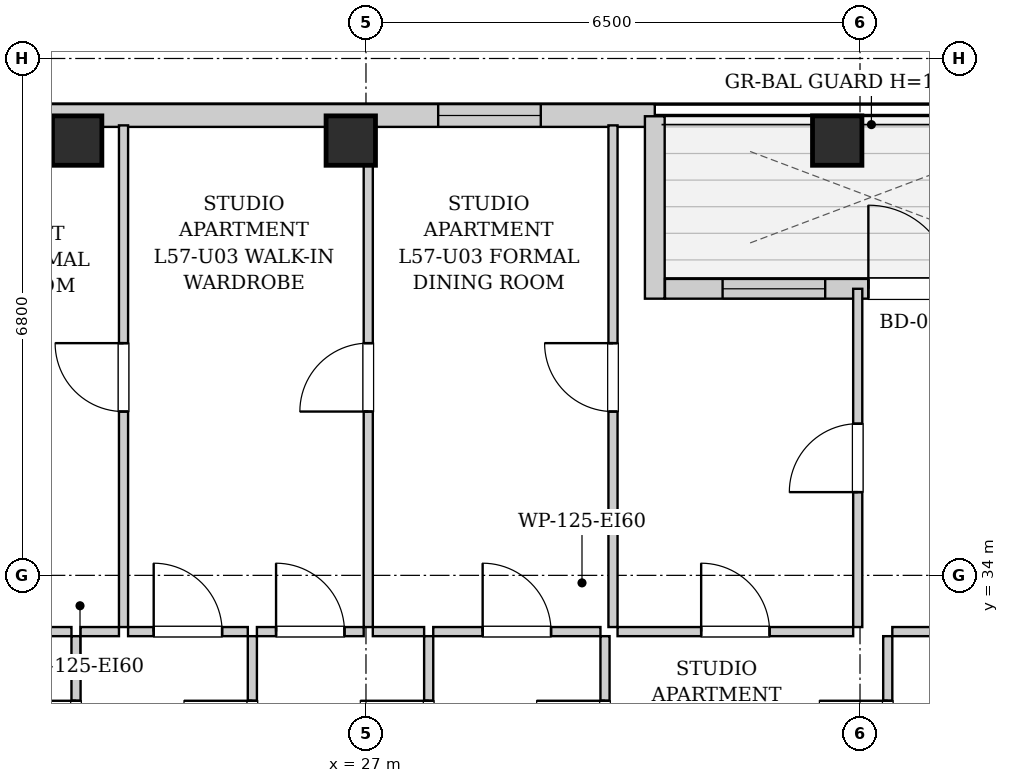
"""IFC4 building model, lengths in metres.
Left out: names, types, materials, properties, quantities, classifications, styles, units other than length and angle.
Written with IfcOpenShell. Run it as: python <this file> out.ifc"""

import sys

from ifc_helpers import new_model, si_unit, direction, frame, frame_2d, origin, origin_2d, place, context, subcontext, project, spatial, rectangle, extrude, element, fill, save


model = new_model("IFC4")
c1 = context("Model", 3, precision=1e-05, world=origin(), true_north=direction((0.0, 1.0)))
c2 = subcontext(c1, "Body", "Model", "MODEL_VIEW")
j1 = project(units=[si_unit("LENGTHUNIT", "METRE"), si_unit("PLANEANGLEUNIT", "RADIAN")], contexts=[c1])
p1 = place(None, origin())
s1 = spatial("IfcSite", under=j1, at=p1, CompositionType="ELEMENT")
p2 = place(p1, origin())
s2 = spatial("IfcBuilding", under=s1, at=p2, CompositionType="ELEMENT")
p3 = place(p2, frame((0.0, 0.0, 197.5)))
s3 = spatial("IfcBuildingStorey", under=s2, at=p3, CompositionType="ELEMENT", Elevation=197.5)
for number, where, z_axis, x_axis in (
    (1, (23.2, 39.72, 0.0), (0.0, 0.0, 1.0), (1.0, 0.0, 0.0)),
    (2, (26.8, 39.72, 0.0), (0.0, 0.0, 1.0), (1.0, 0.0, 0.0)),
    (3, (33.2, 39.72, 0.0), (0.0, 0.0, 1.0), (1.0, 0.0, 0.0)),
):
    element("IfcColumn", number, at=place(p3, frame(where, z_axis=z_axis, x_axis=x_axis)), inside=s3, PredefinedType="COLUMN", context=c2, shape_type="SweptSolid", body=[
        extrude(rectangle(XDim=0.65, YDim=0.65, at=origin_2d()), origin(), (0.0, 0.0, 1.0), 3.3),
    ])
p4 = place(p3, frame((13.1, 40.05, 0.0), z_axis=(0.0, 0.0, 1.0), x_axis=(1.0, 0.0, 0.0)))
e4 = element("IfcWall", 4, at=p4, inside=s3, PredefinedType="SOLIDWALL", context=c2, shape_type="SweptSolid", body=[
    extrude(rectangle(XDim=17.7, YDim=0.3, at=frame_2d((8.85, 0.0))), origin(), (0.0, 0.0, 1.0), 3.04),
])
p5 = place(p4, frame((1.95, 0.0, 0.55)))
e5 = element("IfcOpeningElement", 5, at=p5, cuts=e4, PredefinedType="OPENING", context=c2, shape_type="SweptSolid", body=[
    extrude(rectangle(XDim=1.35, YDim=1.2, at=frame_2d((0.675, 0.6))), frame((0.0, 0.16, 0.0), z_axis=(0.0, -1.0, 0.0), x_axis=(1.0, 0.0, 0.0)), (0.0, 0.0, 1.0), 0.32),
])
p6 = place(p4, frame((5.25, 0.0, 0.55)))
e6 = element("IfcOpeningElement", 6, at=p6, cuts=e4, PredefinedType="OPENING", context=c2, shape_type="SweptSolid", body=[
    extrude(rectangle(XDim=1.35, YDim=1.2, at=frame_2d((0.675, 0.6))), frame((0.0, 0.16, 0.0), z_axis=(0.0, -1.0, 0.0), x_axis=(1.0, 0.0, 0.0)), (0.0, 0.0, 1.0), 0.32),
])
p7 = place(p4, frame((8.05, 0.0, 0.55)))
e7 = element("IfcOpeningElement", 7, at=p7, cuts=e4, PredefinedType="OPENING", context=c2, shape_type="SweptSolid", body=[
    extrude(rectangle(XDim=1.35, YDim=1.2, at=frame_2d((0.675, 0.6))), frame((0.0, 0.16, 0.0), z_axis=(0.0, -1.0, 0.0), x_axis=(1.0, 0.0, 0.0)), (0.0, 0.0, 1.0), 0.32),
])
p8 = place(p4, frame((14.85, 0.0, 0.55)))
e8 = element("IfcOpeningElement", 8, at=p8, cuts=e4, PredefinedType="OPENING", context=c2, shape_type="SweptSolid", body=[
    extrude(rectangle(XDim=1.35, YDim=1.2, at=frame_2d((0.675, 0.6))), frame((0.0, 0.16, 0.0), z_axis=(0.0, -1.0, 0.0), x_axis=(1.0, 0.0, 0.0)), (0.0, 0.0, 1.0), 0.32),
])
p9 = place(p3, frame((30.8, 40.04, 0.0), z_axis=(0.0, 0.0, 1.0), x_axis=(0.0, -1.0, 0.0)))
e9 = element("IfcWall", 9, at=p9, inside=s3, PredefinedType="SOLIDWALL", context=c2, shape_type="SweptSolid", body=[
    extrude(rectangle(XDim=2.4, YDim=0.26, at=frame_2d((1.2, 0.0))), origin(), (0.0, 0.0, 1.0), 3.04),
])
p10 = place(p3, frame((30.934, 37.77, 0.0), z_axis=(0.0, 0.0, 1.0), x_axis=(1.0, 0.0, 0.0)))
e10 = element("IfcWall", 10, at=p10, inside=s3, PredefinedType="SOLIDWALL", context=c2, shape_type="SweptSolid", body=[
    extrude(rectangle(XDim=5.432, YDim=0.26, at=frame_2d((2.716, 0.0))), origin(), (0.0, 0.0, 1.0), 3.04),
])
p11 = place(p10, frame((2.676, 0.0, 0.0)))
e11 = element("IfcOpeningElement", 11, at=p11, cuts=e10, PredefinedType="OPENING", context=c2, shape_type="SweptSolid", body=[
    extrude(rectangle(XDim=1.1, YDim=2.0, at=frame_2d((0.55, 1.0))), frame((0.0, 0.14, 0.0), z_axis=(0.0, -1.0, 0.0), x_axis=(1.0, 0.0, 0.0)), (0.0, 0.0, 1.0), 0.28),
])
p12 = place(p10, frame((0.758, 0.0, 0.55)))
e12 = element("IfcOpeningElement", 12, at=p12, cuts=e10, PredefinedType="OPENING", context=c2, shape_type="SweptSolid", body=[
    extrude(rectangle(XDim=1.35, YDim=1.2, at=frame_2d((0.675, 0.6))), frame((0.0, 0.14, 0.0), z_axis=(0.0, -1.0, 0.0), x_axis=(1.0, 0.0, 0.0)), (0.0, 0.0, 1.0), 0.28),
])
p13 = place(p3, frame((23.185, 30.6, 0.0), z_axis=(0.0, 0.0, 1.0), x_axis=(0.0, 1.0, 0.0)))
e13 = element("IfcWall", 13, at=p13, inside=s3, PredefinedType="PARTITIONING", context=c2, shape_type="SweptSolid", body=[
    extrude(rectangle(XDim=2.6, YDim=0.12, at=frame_2d((1.3, 0.0))), origin(), (0.0, 0.0, 1.0), 3.04),
])
p14 = place(p13, frame((0.85, 0.0, 0.0)))
e14 = element("IfcOpeningElement", 14, at=p14, cuts=e13, PredefinedType="OPENING", context=c2, shape_type="SweptSolid", body=[
    extrude(rectangle(XDim=0.9, YDim=2.05, at=frame_2d((0.45, 1.025))), frame((0.0, 0.07, 0.0), z_axis=(0.0, -1.0, 0.0), x_axis=(1.0, 0.0, 0.0)), (0.0, 0.0, 1.0), 0.14),
])
p15 = place(p3, frame((20.65, 33.26, 0.0), z_axis=(0.0, 0.0, 1.0), x_axis=(1.0, 0.0, 0.0)))
e15 = element("IfcWall", 15, at=p15, inside=s3, PredefinedType="PARTITIONING", context=c2, shape_type="SweptSolid", body=[
    extrude(rectangle(XDim=2.475, YDim=0.12, at=frame_2d((1.238, 0.0))), origin(), (0.0, 0.0, 1.0), 3.04),
])
p16 = place(p15, frame((0.787, 0.0, 0.0)))
e16 = element("IfcOpeningElement", 16, at=p16, cuts=e15, PredefinedType="OPENING", context=c2, shape_type="SweptSolid", body=[
    extrude(rectangle(XDim=0.9, YDim=2.05, at=frame_2d((0.45, 1.025))), frame((0.0, 0.07, 0.0), z_axis=(0.0, -1.0, 0.0), x_axis=(1.0, 0.0, 0.0)), (0.0, 0.0, 1.0), 0.14),
])
p17 = place(p3, frame((25.505, 30.6, 0.0), z_axis=(0.0, 0.0, 1.0), x_axis=(0.0, 1.0, 0.0)))
e17 = element("IfcWall", 17, at=p17, inside=s3, PredefinedType="PARTITIONING", context=c2, shape_type="SweptSolid", body=[
    extrude(rectangle(XDim=2.6, YDim=0.12, at=frame_2d((1.3, 0.0))), origin(), (0.0, 0.0, 1.0), 3.04),
])
p18 = place(p17, frame((0.85, 0.0, 0.0)))
e18 = element("IfcOpeningElement", 18, at=p18, cuts=e17, PredefinedType="OPENING", context=c2, shape_type="SweptSolid", body=[
    extrude(rectangle(XDim=0.9, YDim=2.05, at=frame_2d((0.45, 1.025))), frame((0.0, 0.07, 0.0), z_axis=(0.0, -1.0, 0.0), x_axis=(1.0, 0.0, 0.0)), (0.0, 0.0, 1.0), 0.14),
])
p19 = place(p3, frame((23.245, 33.26, 0.0), z_axis=(0.0, 0.0, 1.0), x_axis=(1.0, 0.0, 0.0)))
e19 = element("IfcWall", 19, at=p19, inside=s3, PredefinedType="PARTITIONING", context=c2, shape_type="SweptSolid", body=[
    extrude(rectangle(XDim=0.505, YDim=0.12, at=frame_2d((0.252, 0.0))), origin(), (0.0, 0.0, 1.0), 3.04),
])
p20 = place(p3, frame((23.87, 33.26, 0.0), z_axis=(0.0, 0.0, 1.0), x_axis=(1.0, 0.0, 0.0)))
e20 = element("IfcWall", 20, at=p20, inside=s3, PredefinedType="PARTITIONING", context=c2, shape_type="SweptSolid", body=[
    extrude(rectangle(XDim=1.575, YDim=0.12, at=frame_2d((0.788, 0.0))), origin(), (0.0, 0.0, 1.0), 3.04),
])
p21 = place(p20, frame((0.337, 0.0, 0.0)))
e21 = element("IfcOpeningElement", 21, at=p21, cuts=e20, PredefinedType="OPENING", context=c2, shape_type="SweptSolid", body=[
    extrude(rectangle(XDim=0.9, YDim=2.05, at=frame_2d((0.45, 1.025))), frame((0.0, 0.07, 0.0), z_axis=(0.0, -1.0, 0.0), x_axis=(1.0, 0.0, 0.0)), (0.0, 0.0, 1.0), 0.14),
])
p22 = place(p3, frame((27.825, 30.6, 0.0), z_axis=(0.0, 0.0, 1.0), x_axis=(0.0, 1.0, 0.0)))
e22 = element("IfcWall", 22, at=p22, inside=s3, PredefinedType="PARTITIONING", context=c2, shape_type="SweptSolid", body=[
    extrude(rectangle(XDim=2.6, YDim=0.12, at=frame_2d((1.3, 0.0))), origin(), (0.0, 0.0, 1.0), 3.04),
])
p23 = place(p22, frame((0.85, 0.0, 0.0)))
e23 = element("IfcOpeningElement", 23, at=p23, cuts=e22, PredefinedType="OPENING", context=c2, shape_type="SweptSolid", body=[
    extrude(rectangle(XDim=0.9, YDim=2.05, at=frame_2d((0.45, 1.025))), frame((0.0, 0.07, 0.0), z_axis=(0.0, -1.0, 0.0), x_axis=(1.0, 0.0, 0.0)), (0.0, 0.0, 1.0), 0.14),
])
p24 = place(p3, frame((25.565, 33.26, 0.0), z_axis=(0.0, 0.0, 1.0), x_axis=(1.0, 0.0, 0.0)))
e24 = element("IfcWall", 24, at=p24, inside=s3, PredefinedType="PARTITIONING", context=c2, shape_type="SweptSolid", body=[
    extrude(rectangle(XDim=1.405, YDim=0.12, at=frame_2d((0.703, 0.0))), origin(), (0.0, 0.0, 1.0), 3.04),
])
p25 = place(p24, frame((0.252, 0.0, 0.0)))
e25 = element("IfcOpeningElement", 25, at=p25, cuts=e24, PredefinedType="OPENING", context=c2, shape_type="SweptSolid", body=[
    extrude(rectangle(XDim=0.9, YDim=2.05, at=frame_2d((0.45, 1.025))), frame((0.0, 0.07, 0.0), z_axis=(0.0, -1.0, 0.0), x_axis=(1.0, 0.0, 0.0)), (0.0, 0.0, 1.0), 0.14),
])
p26 = place(p3, frame((27.09, 33.26, 0.0), z_axis=(0.0, 0.0, 1.0), x_axis=(1.0, 0.0, 0.0)))
e26 = element("IfcWall", 26, at=p26, inside=s3, PredefinedType="PARTITIONING", context=c2, shape_type="SweptSolid", body=[
    extrude(rectangle(XDim=0.675, YDim=0.12, at=frame_2d((0.337, 0.0))), origin(), (0.0, 0.0, 1.0), 3.04),
])
p27 = place(p3, frame((30.145, 30.6, 0.0), z_axis=(0.0, 0.0, 1.0), x_axis=(0.0, 1.0, 0.0)))
e27 = element("IfcWall", 27, at=p27, inside=s3, PredefinedType="PARTITIONING", context=c2, shape_type="SweptSolid", body=[
    extrude(rectangle(XDim=2.6, YDim=0.12, at=frame_2d((1.3, 0.0))), origin(), (0.0, 0.0, 1.0), 3.04),
])
p28 = place(p27, frame((0.85, 0.0, 0.0)))
e28 = element("IfcOpeningElement", 28, at=p28, cuts=e27, PredefinedType="OPENING", context=c2, shape_type="SweptSolid", body=[
    extrude(rectangle(XDim=0.9, YDim=2.05, at=frame_2d((0.45, 1.025))), frame((0.0, 0.07, 0.0), z_axis=(0.0, -1.0, 0.0), x_axis=(1.0, 0.0, 0.0)), (0.0, 0.0, 1.0), 0.14),
])
p29 = place(p3, frame((27.885, 33.26, 0.0), z_axis=(0.0, 0.0, 1.0), x_axis=(1.0, 0.0, 0.0)))
e29 = element("IfcWall", 29, at=p29, inside=s3, PredefinedType="PARTITIONING", context=c2, shape_type="SweptSolid", body=[
    extrude(rectangle(XDim=2.2, YDim=0.12, at=frame_2d((1.1, 0.0))), origin(), (0.0, 0.0, 1.0), 3.04),
])
p30 = place(p29, frame((0.65, 0.0, 0.0)))
e30 = element("IfcOpeningElement", 30, at=p30, cuts=e29, PredefinedType="OPENING", context=c2, shape_type="SweptSolid", body=[
    extrude(rectangle(XDim=0.9, YDim=2.05, at=frame_2d((0.45, 1.025))), frame((0.0, 0.07, 0.0), z_axis=(0.0, -1.0, 0.0), x_axis=(1.0, 0.0, 0.0)), (0.0, 0.0, 1.0), 0.14),
])
p31 = place(p3, frame((33.865, 30.6, 0.0), z_axis=(0.0, 0.0, 1.0), x_axis=(0.0, 1.0, 0.0)))
e31 = element("IfcWall", 31, at=p31, inside=s3, PredefinedType="PARTITIONING", context=c2, shape_type="SweptSolid", body=[
    extrude(rectangle(XDim=2.6, YDim=0.12, at=frame_2d((1.3, 0.0))), origin(), (0.0, 0.0, 1.0), 3.04),
])
p32 = place(p31, frame((0.85, 0.0, 0.0)))
e32 = element("IfcOpeningElement", 32, at=p32, cuts=e31, PredefinedType="OPENING", context=c2, shape_type="SweptSolid", body=[
    extrude(rectangle(XDim=0.9, YDim=2.05, at=frame_2d((0.45, 1.025))), frame((0.0, 0.07, 0.0), z_axis=(0.0, -1.0, 0.0), x_axis=(1.0, 0.0, 0.0)), (0.0, 0.0, 1.0), 0.14),
])
p33 = place(p3, frame((30.31, 33.26, 0.0), z_axis=(0.0, 0.0, 1.0), x_axis=(1.0, 0.0, 0.0)))
e33 = element("IfcWall", 33, at=p33, inside=s3, PredefinedType="PARTITIONING", context=c2, shape_type="SweptSolid", body=[
    extrude(rectangle(XDim=3.1, YDim=0.12, at=frame_2d((1.55, 0.0))), origin(), (0.0, 0.0, 1.0), 3.04),
])
p34 = place(p33, frame((1.1, 0.0, 0.0)))
e34 = element("IfcOpeningElement", 34, at=p34, cuts=e33, PredefinedType="OPENING", context=c2, shape_type="SweptSolid", body=[
    extrude(rectangle(XDim=0.9, YDim=2.05, at=frame_2d((0.45, 1.025))), frame((0.0, 0.07, 0.0), z_axis=(0.0, -1.0, 0.0), x_axis=(1.0, 0.0, 0.0)), (0.0, 0.0, 1.0), 0.14),
])
p35 = place(p3, frame((33.925, 33.26, 0.0), z_axis=(0.0, 0.0, 1.0), x_axis=(1.0, 0.0, 0.0)))
e35 = element("IfcWall", 35, at=p35, inside=s3, PredefinedType="PARTITIONING", context=c2, shape_type="SweptSolid", body=[
    extrude(rectangle(XDim=3.795, YDim=0.12, at=frame_2d((1.897, 0.0))), origin(), (0.0, 0.0, 1.0), 3.04),
])
p36 = place(p35, frame((1.448, 0.0, 0.0)))
e36 = element("IfcOpeningElement", 36, at=p36, cuts=e35, PredefinedType="OPENING", context=c2, shape_type="SweptSolid", body=[
    extrude(rectangle(XDim=0.9, YDim=2.05, at=frame_2d((0.45, 1.025))), frame((0.0, 0.07, 0.0), z_axis=(0.0, -1.0, 0.0), x_axis=(1.0, 0.0, 0.0)), (0.0, 0.0, 1.0), 0.14),
])
p37 = place(p3, frame((23.81, 33.32, 0.0), z_axis=(0.0, 0.0, 1.0), x_axis=(0.0, 1.0, 0.0)))
e37 = element("IfcWall", 37, at=p37, inside=s3, PredefinedType="PARTITIONING", context=c2, shape_type="SweptSolid", body=[
    extrude(rectangle(XDim=6.6, YDim=0.12, at=frame_2d((3.3, 0.0))), origin(), (0.0, 0.0, 1.0), 3.04),
])
p38 = place(p37, frame((2.835, 0.0, 0.0)))
e38 = element("IfcOpeningElement", 38, at=p38, cuts=e37, PredefinedType="OPENING", context=c2, shape_type="SweptSolid", body=[
    extrude(rectangle(XDim=0.9, YDim=2.05, at=frame_2d((0.45, 1.025))), frame((0.0, 0.07, 0.0), z_axis=(0.0, -1.0, 0.0), x_axis=(1.0, 0.0, 0.0)), (0.0, 0.0, 1.0), 0.14),
])
p39 = place(p3, frame((27.03, 33.32, 0.0), z_axis=(0.0, 0.0, 1.0), x_axis=(0.0, 1.0, 0.0)))
e39 = element("IfcWall", 39, at=p39, inside=s3, PredefinedType="PARTITIONING", context=c2, shape_type="SweptSolid", body=[
    extrude(rectangle(XDim=6.6, YDim=0.12, at=frame_2d((3.3, 0.0))), origin(), (0.0, 0.0, 1.0), 3.04),
])
p40 = place(p39, frame((2.835, 0.0, 0.0)))
e40 = element("IfcOpeningElement", 40, at=p40, cuts=e39, PredefinedType="OPENING", context=c2, shape_type="SweptSolid", body=[
    extrude(rectangle(XDim=0.9, YDim=2.05, at=frame_2d((0.45, 1.025))), frame((0.0, 0.07, 0.0), z_axis=(0.0, -1.0, 0.0), x_axis=(1.0, 0.0, 0.0)), (0.0, 0.0, 1.0), 0.14),
])
p41 = place(p3, frame((30.25, 33.32, 0.0), z_axis=(0.0, 0.0, 1.0), x_axis=(0.0, 1.0, 0.0)))
e41 = element("IfcWall", 41, at=p41, inside=s3, PredefinedType="PARTITIONING", context=c2, shape_type="SweptSolid", body=[
    extrude(rectangle(XDim=6.6, YDim=0.12, at=frame_2d((3.3, 0.0))), origin(), (0.0, 0.0, 1.0), 3.04),
])
p42 = place(p41, frame((2.835, 0.0, 0.0)))
e42 = element("IfcOpeningElement", 42, at=p42, cuts=e41, PredefinedType="OPENING", context=c2, shape_type="SweptSolid", body=[
    extrude(rectangle(XDim=0.9, YDim=2.05, at=frame_2d((0.45, 1.025))), frame((0.0, 0.07, 0.0), z_axis=(0.0, -1.0, 0.0), x_axis=(1.0, 0.0, 0.0)), (0.0, 0.0, 1.0), 0.14),
])
p43 = place(p3, frame((33.47, 33.32, 0.0), z_axis=(0.0, 0.0, 1.0), x_axis=(0.0, 1.0, 0.0)))
e43 = element("IfcWall", 43, at=p43, inside=s3, PredefinedType="PARTITIONING", context=c2, shape_type="SweptSolid", body=[
    extrude(rectangle(XDim=4.45, YDim=0.12, at=frame_2d((2.225, 0.0))), origin(), (0.0, 0.0, 1.0), 3.04),
])
p44 = place(p43, frame((1.775, 0.0, 0.0)))
e44 = element("IfcOpeningElement", 44, at=p44, cuts=e43, PredefinedType="OPENING", context=c2, shape_type="SweptSolid", body=[
    extrude(rectangle(XDim=0.9, YDim=2.05, at=frame_2d((0.45, 1.025))), frame((0.0, 0.07, 0.0), z_axis=(0.0, -1.0, 0.0), x_axis=(1.0, 0.0, 0.0)), (0.0, 0.0, 1.0), 0.14),
])
p45 = place(p14, origin())
e45 = element("IfcDoor", 45, at=p45, inside=s3, OperationType="SINGLE_SWING_RIGHT", PredefinedType="DOOR", context=c2, shape_type="SweptSolid", body=[
    extrude(rectangle(XDim=0.9, YDim=2.05, at=frame_2d((0.45, 1.025))), frame((0.0, 0.025, 0.0), z_axis=(0.0, -1.0, 0.0), x_axis=(1.0, 0.0, 0.0)), (0.0, 0.0, 1.0), 0.05),
])
fill(e14, e45)
p46 = place(p18, origin())
e46 = element("IfcDoor", 46, at=p46, inside=s3, OperationType="SINGLE_SWING_RIGHT", PredefinedType="DOOR", context=c2, shape_type="SweptSolid", body=[
    extrude(rectangle(XDim=0.9, YDim=2.05, at=frame_2d((0.45, 1.025))), frame((0.0, 0.025, 0.0), z_axis=(0.0, -1.0, 0.0), x_axis=(1.0, 0.0, 0.0)), (0.0, 0.0, 1.0), 0.05),
])
fill(e18, e46)
p47 = place(p21, origin())
e47 = element("IfcDoor", 47, at=p47, inside=s3, OperationType="SINGLE_SWING_LEFT", PredefinedType="DOOR", context=c2, shape_type="SweptSolid", body=[
    extrude(rectangle(XDim=0.9, YDim=2.05, at=frame_2d((0.45, 1.025))), frame((0.0, 0.025, 0.0), z_axis=(0.0, -1.0, 0.0), x_axis=(1.0, 0.0, 0.0)), (0.0, 0.0, 1.0), 0.05),
])
fill(e21, e47)
p48 = place(p23, origin())
e48 = element("IfcDoor", 48, at=p48, inside=s3, OperationType="SINGLE_SWING_RIGHT", PredefinedType="DOOR", context=c2, shape_type="SweptSolid", body=[
    extrude(rectangle(XDim=0.9, YDim=2.05, at=frame_2d((0.45, 1.025))), frame((0.0, 0.025, 0.0), z_axis=(0.0, -1.0, 0.0), x_axis=(1.0, 0.0, 0.0)), (0.0, 0.0, 1.0), 0.05),
])
fill(e23, e48)
p49 = place(p25, origin())
e49 = element("IfcDoor", 49, at=p49, inside=s3, OperationType="SINGLE_SWING_LEFT", PredefinedType="DOOR", context=c2, shape_type="SweptSolid", body=[
    extrude(rectangle(XDim=0.9, YDim=2.05, at=frame_2d((0.45, 1.025))), frame((0.0, 0.025, 0.0), z_axis=(0.0, -1.0, 0.0), x_axis=(1.0, 0.0, 0.0)), (0.0, 0.0, 1.0), 0.05),
])
fill(e25, e49)
p50 = place(p28, origin())
e50 = element("IfcDoor", 50, at=p50, inside=s3, OperationType="SINGLE_SWING_RIGHT", PredefinedType="DOOR", context=c2, shape_type="SweptSolid", body=[
    extrude(rectangle(XDim=0.9, YDim=2.05, at=frame_2d((0.45, 1.025))), frame((0.0, 0.025, 0.0), z_axis=(0.0, -1.0, 0.0), x_axis=(1.0, 0.0, 0.0)), (0.0, 0.0, 1.0), 0.05),
])
fill(e28, e50)
p51 = place(p30, origin())
e51 = element("IfcDoor", 51, at=p51, inside=s3, OperationType="SINGLE_SWING_LEFT", PredefinedType="DOOR", context=c2, shape_type="SweptSolid", body=[
    extrude(rectangle(XDim=0.9, YDim=2.05, at=frame_2d((0.45, 1.025))), frame((0.0, 0.025, 0.0), z_axis=(0.0, -1.0, 0.0), x_axis=(1.0, 0.0, 0.0)), (0.0, 0.0, 1.0), 0.05),
])
fill(e30, e51)
p52 = place(p32, origin())
e52 = element("IfcDoor", 52, at=p52, inside=s3, OperationType="SINGLE_SWING_RIGHT", PredefinedType="DOOR", context=c2, shape_type="SweptSolid", body=[
    extrude(rectangle(XDim=0.9, YDim=2.05, at=frame_2d((0.45, 1.025))), frame((0.0, 0.025, 0.0), z_axis=(0.0, -1.0, 0.0), x_axis=(1.0, 0.0, 0.0)), (0.0, 0.0, 1.0), 0.05),
])
fill(e32, e52)
p53 = place(p34, origin())
e53 = element("IfcDoor", 53, at=p53, inside=s3, OperationType="SINGLE_SWING_LEFT", PredefinedType="DOOR", context=c2, shape_type="SweptSolid", body=[
    extrude(rectangle(XDim=0.9, YDim=2.05, at=frame_2d((0.45, 1.025))), frame((0.0, 0.025, 0.0), z_axis=(0.0, -1.0, 0.0), x_axis=(1.0, 0.0, 0.0)), (0.0, 0.0, 1.0), 0.05),
])
fill(e34, e53)
p54 = place(p38, origin())
e54 = element("IfcDoor", 54, at=p54, inside=s3, OperationType="SINGLE_SWING_RIGHT", PredefinedType="DOOR", context=c2, shape_type="SweptSolid", body=[
    extrude(rectangle(XDim=0.9, YDim=2.05, at=frame_2d((0.45, 1.025))), frame((0.0, 0.025, 0.0), z_axis=(0.0, -1.0, 0.0), x_axis=(1.0, 0.0, 0.0)), (0.0, 0.0, 1.0), 0.05),
])
fill(e38, e54)
p55 = place(p40, origin())
e55 = element("IfcDoor", 55, at=p55, inside=s3, OperationType="SINGLE_SWING_LEFT", PredefinedType="DOOR", context=c2, shape_type="SweptSolid", body=[
    extrude(rectangle(XDim=0.9, YDim=2.05, at=frame_2d((0.45, 1.025))), frame((0.0, 0.025, 0.0), z_axis=(0.0, -1.0, 0.0), x_axis=(1.0, 0.0, 0.0)), (0.0, 0.0, 1.0), 0.05),
])
fill(e40, e55)
p56 = place(p42, origin())
e56 = element("IfcDoor", 56, at=p56, inside=s3, OperationType="SINGLE_SWING_RIGHT", PredefinedType="DOOR", context=c2, shape_type="SweptSolid", body=[
    extrude(rectangle(XDim=0.9, YDim=2.05, at=frame_2d((0.45, 1.025))), frame((0.0, 0.025, 0.0), z_axis=(0.0, -1.0, 0.0), x_axis=(1.0, 0.0, 0.0)), (0.0, 0.0, 1.0), 0.05),
])
fill(e42, e56)
p57 = place(p44, origin())
e57 = element("IfcDoor", 57, at=p57, inside=s3, OperationType="SINGLE_SWING_LEFT", PredefinedType="DOOR", context=c2, shape_type="SweptSolid", body=[
    extrude(rectangle(XDim=0.9, YDim=2.05, at=frame_2d((0.45, 1.025))), frame((0.0, 0.025, 0.0), z_axis=(0.0, -1.0, 0.0), x_axis=(1.0, 0.0, 0.0)), (0.0, 0.0, 1.0), 0.05),
])
fill(e44, e57)
p58 = place(p11, origin())
e58 = element("IfcDoor", 58, at=p58, inside=s3, OperationType="SINGLE_SWING_LEFT", PredefinedType="DOOR", context=c2, shape_type="SweptSolid", body=[
    extrude(rectangle(XDim=1.1, YDim=2.0, at=frame_2d((0.55, 1.0))), frame((0.0, 0.025, 0.0), z_axis=(0.0, -1.0, 0.0), x_axis=(1.0, 0.0, 0.0)), (0.0, 0.0, 1.0), 0.05),
])
fill(e11, e58)
p59 = place(p8, origin())
e59 = element("IfcWindow", 59, at=p59, inside=s3, PartitioningType="SINGLE_PANEL", PredefinedType="WINDOW", context=c2, shape_type="SweptSolid", body=[
    extrude(rectangle(XDim=1.35, YDim=1.2, at=frame_2d((0.675, 0.6))), frame((0.0, 0.03, 0.0), z_axis=(0.0, -1.0, 0.0), x_axis=(1.0, 0.0, 0.0)), (0.0, 0.0, 1.0), 0.06),
])
fill(e8, e59)
p60 = place(p12, origin())
e60 = element("IfcWindow", 60, at=p60, inside=s3, PartitioningType="SINGLE_PANEL", PredefinedType="WINDOW", context=c2, shape_type="SweptSolid", body=[
    extrude(rectangle(XDim=1.35, YDim=1.2, at=frame_2d((0.675, 0.6))), frame((0.0, 0.03, 0.0), z_axis=(0.0, -1.0, 0.0), x_axis=(1.0, 0.0, 0.0)), (0.0, 0.0, 1.0), 0.06),
])
fill(e12, e60)
save(model, sys.argv[1])
